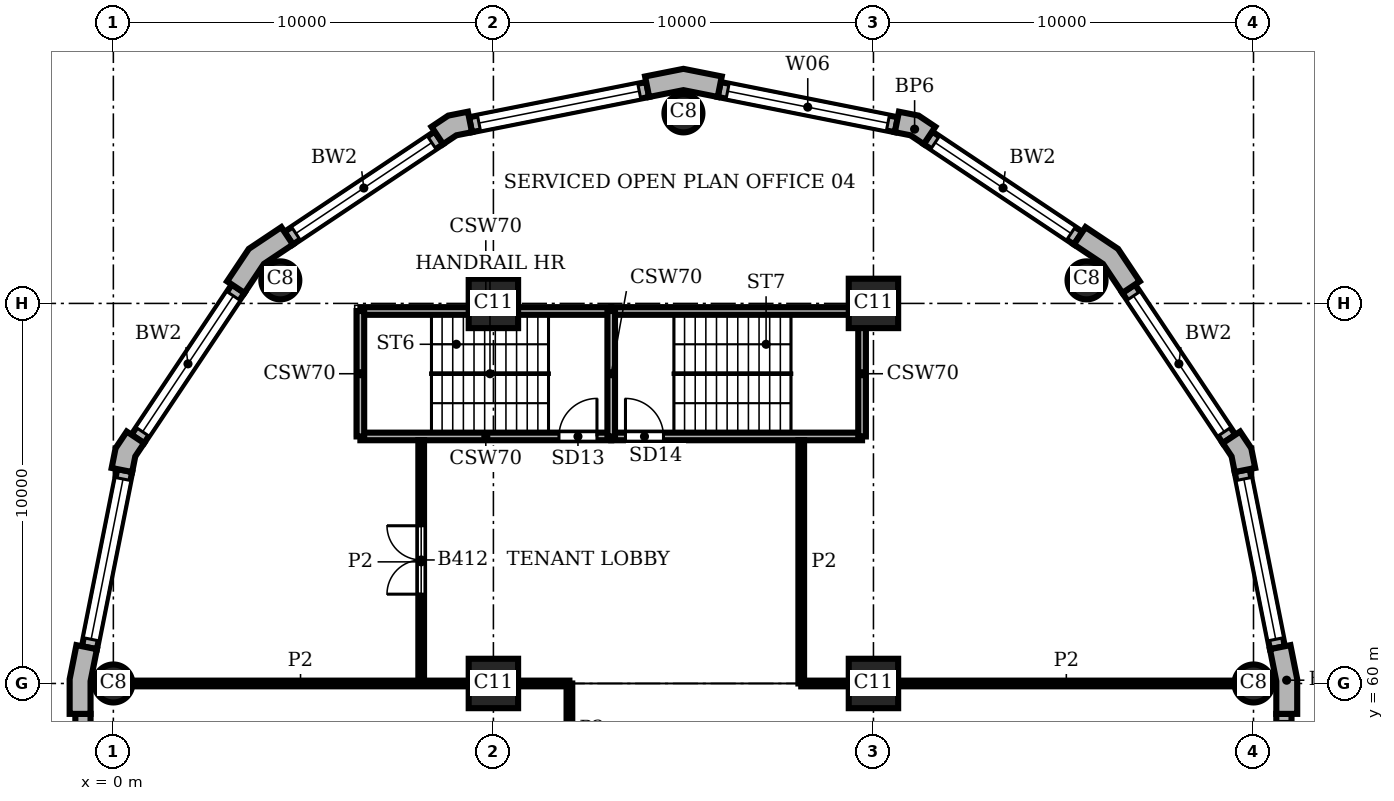
"""IFC4 building model, lengths in metres.
Left out: names, types, materials, properties, quantities, classifications, styles, units other than length and angle.
Written with IfcOpenShell. Run it as: python <this file> out.ifc"""

import sys

from ifc_helpers import new_model, si_unit, direction, frame, frame_2d, origin, origin_2d, place, context, subcontext, project, spatial, polyline, rectangle, circle, outline, extrude, element, fill, save


model = new_model("IFC4")
c1 = context("Model", 3, precision=1e-05, world=origin(), true_north=direction((0.0, 1.0)))
c2 = subcontext(c1, "Body", "Model", "MODEL_VIEW")
j1 = project(units=[si_unit("LENGTHUNIT", "METRE"), si_unit("PLANEANGLEUNIT", "RADIAN")], contexts=[c1])
p1 = place(None, origin())
s1 = spatial("IfcSite", under=j1, at=p1, CompositionType="ELEMENT")
p2 = place(p1, origin())
s2 = spatial("IfcBuilding", under=s1, at=p2, CompositionType="ELEMENT")
p3 = place(p2, frame((0.0, 0.0, 166.8)))
s3 = spatial("IfcBuildingStorey", under=s2, at=p3, CompositionType="ELEMENT", Elevation=166.8)
for number, where, z_axis, x_axis in (
    (1, (30.0, 60.0, 0.0), (0.0, 0.0, 1.0), (1.0, 0.0, 0.0)),
    (2, (25.607, 70.607, 0.0), (0.0, 0.0, 1.0), (1.0, 0.0, 0.0)),
    (3, (15.0, 75.0, 0.0), (0.0, 0.0, 1.0), (1.0, 0.0, 0.0)),
    (4, (4.393, 70.607, 0.0), (0.0, 0.0, 1.0), (1.0, 0.0, 0.0)),
    (5, (0.0, 60.0, 0.0), (0.0, 0.0, 1.0), (1.0, 0.0, 0.0)),
):
    element("IfcColumn", number, at=place(p3, frame(where, z_axis=z_axis, x_axis=x_axis)), inside=s3, PredefinedType="COLUMN", context=c2, shape_type="SweptSolid", body=[
        extrude(circle(Radius=0.5, at=origin_2d()), origin(), (0.0, 0.0, 1.0), 3.9),
    ])
for number, where, z_axis, x_axis in (
    (6, (10.0, 60.0, 0.0), (0.0, 0.0, 1.0), (1.0, 0.0, 0.0)),
    (7, (10.0, 70.0, 0.0), (0.0, 0.0, 1.0), (1.0, 0.0, 0.0)),
    (8, (20.0, 60.0, 0.0), (0.0, 0.0, 1.0), (1.0, 0.0, 0.0)),
    (9, (20.0, 70.0, 0.0), (0.0, 0.0, 1.0), (1.0, 0.0, 0.0)),
):
    element("IfcColumn", number, at=place(p3, frame(where, z_axis=z_axis, x_axis=x_axis)), inside=s3, PredefinedType="COLUMN", context=c2, shape_type="SweptSolid", body=[
        extrude(rectangle(XDim=1.3, YDim=1.3, at=origin_2d()), origin(), (0.0, 0.0, 1.0), 3.9),
    ])
p4 = place(p3, origin())
e10 = element("IfcWall", 10, at=p4, inside=s3, PredefinedType="SOLIDWALL", context=c2, shape_type="SweptSolid", body=[
    extrude(outline(polyline([(31.0, 59.2), (31.15, 59.2), (31.15, 60.113), (30.972, 61.009), (30.825, 60.98), (30.432, 60.902), (30.6, 60.059), (30.6, 59.2), (31.0, 59.2)])), origin(), (0.0, 0.0, 1.0), 3.9),
])
e11 = element("IfcWall", 11, at=p4, inside=s3, PredefinedType="SOLIDWALL", context=c2, shape_type="SweptSolid", body=[
    extrude(outline(polyline([(29.897, 65.641), (30.045, 65.67), (29.941, 66.189), (29.648, 66.629), (29.523, 66.545), (29.19, 66.323), (29.423, 65.974), (29.505, 65.563), (29.897, 65.641)])), origin(), (0.0, 0.0, 1.0), 3.9),
])
e12 = element("IfcWall", 12, at=p4, inside=s3, PredefinedType="SOLIDWALL", context=c2, shape_type="SweptSolid", body=[
    extrude(outline(polyline([(26.883, 70.497), (27.007, 70.58), (26.436, 71.436), (25.58, 72.007), (25.497, 71.883), (25.275, 71.55), (26.039, 71.039), (26.55, 70.275), (26.883, 70.497)])), origin(), (0.0, 0.0, 1.0), 3.9),
])
e13 = element("IfcWall", 13, at=p4, inside=s3, PredefinedType="SOLIDWALL", context=c2, shape_type="SweptSolid", body=[
    extrude(outline(polyline([(21.545, 74.523), (21.629, 74.648), (21.189, 74.941), (20.67, 75.045), (20.641, 74.897), (20.563, 74.505), (20.974, 74.423), (21.323, 74.19), (21.545, 74.523)])), origin(), (0.0, 0.0, 1.0), 3.9),
])
e14 = element("IfcWall", 14, at=p4, inside=s3, PredefinedType="SOLIDWALL", context=c2, shape_type="SweptSolid", body=[
    extrude(outline(polyline([(15.98, 75.825), (16.009, 75.972), (15.0, 76.173), (13.991, 75.972), (14.02, 75.825), (14.098, 75.432), (15.0, 75.612), (15.902, 75.432), (15.98, 75.825)])), origin(), (0.0, 0.0, 1.0), 3.9),
])
e15 = element("IfcWall", 15, at=p4, inside=s3, PredefinedType="SOLIDWALL", context=c2, shape_type="SweptSolid", body=[
    extrude(outline(polyline([(9.359, 74.897), (9.33, 75.045), (8.811, 74.941), (8.371, 74.648), (8.455, 74.523), (8.677, 74.19), (9.026, 74.423), (9.437, 74.505), (9.359, 74.897)])), origin(), (0.0, 0.0, 1.0), 3.9),
])
e16 = element("IfcWall", 16, at=p4, inside=s3, PredefinedType="SOLIDWALL", context=c2, shape_type="SweptSolid", body=[
    extrude(outline(polyline([(4.503, 71.883), (4.42, 72.007), (3.564, 71.436), (2.993, 70.58), (3.117, 70.497), (3.45, 70.275), (3.961, 71.039), (4.725, 71.55), (4.503, 71.883)])), origin(), (0.0, 0.0, 1.0), 3.9),
])
e17 = element("IfcWall", 17, at=p4, inside=s3, PredefinedType="SOLIDWALL", context=c2, shape_type="SweptSolid", body=[
    extrude(outline(polyline([(0.477, 66.545), (0.352, 66.629), (0.059, 66.189), (-0.045, 65.67), (0.103, 65.641), (0.495, 65.563), (0.577, 65.974), (0.81, 66.323), (0.477, 66.545)])), origin(), (0.0, 0.0, 1.0), 3.9),
])
e18 = element("IfcWall", 18, at=p4, inside=s3, PredefinedType="SOLIDWALL", context=c2, shape_type="SweptSolid", body=[
    extrude(outline(polyline([(-0.825, 60.98), (-0.972, 61.009), (-1.15, 60.113), (-1.15, 59.2), (-1.0, 59.2), (-0.6, 59.2), (-0.6, 60.059), (-0.432, 60.902), (-0.825, 60.98)])), origin(), (0.0, 0.0, 1.0), 3.9),
])
p5 = place(p3, frame((30.8, 40.8, 0.0), z_axis=(0.0, 0.0, 1.0), x_axis=(0.0, 1.0, 0.0)))
e19 = element("IfcWall", 19, at=p5, inside=s3, PredefinedType="SOLIDWALL", context=c2, shape_type="SweptSolid", body=[
    extrude(rectangle(XDim=18.4, YDim=0.4, at=frame_2d((9.2, 0.0))), origin(), (0.0, 0.0, 1.0), 3.9),
])
p6 = place(p5, frame((0.2, 0.0, 0.9)))
e20 = element("IfcOpeningElement", 20, at=p6, cuts=e19, PredefinedType="OPENING", context=c2, shape_type="SweptSolid", body=[
    extrude(rectangle(XDim=8.0, YDim=2.35, at=frame_2d((4.0, 1.175))), frame((0.0, 0.21, 0.0), z_axis=(0.0, -1.0, 0.0), x_axis=(1.0, 0.0, 0.0)), (0.0, 0.0, 1.0), 0.42),
])
p7 = place(p5, frame((10.2, 0.0, 0.9)))
e21 = element("IfcOpeningElement", 21, at=p7, cuts=e19, PredefinedType="OPENING", context=c2, shape_type="SweptSolid", body=[
    extrude(rectangle(XDim=8.0, YDim=2.35, at=frame_2d((4.0, 1.175))), frame((0.0, 0.21, 0.0), z_axis=(0.0, -1.0, 0.0), x_axis=(1.0, 0.0, 0.0)), (0.0, 0.0, 1.0), 0.42),
])
p8 = place(p3, frame((30.629, 60.941, 0.0), z_axis=(0.0, 0.0, 1.0), x_axis=(-0.195098533057, 0.98078364709, 0.0)))
e22 = element("IfcWall", 22, at=p8, inside=s3, PredefinedType="SOLIDWALL", context=c2, shape_type="SweptSolid", body=[
    extrude(rectangle(XDim=4.753, YDim=0.4, at=frame_2d((2.376, 0.0))), origin(), (0.0, 0.0, 1.0), 3.9),
])
p9 = place(p8, frame((0.226, 0.0, 0.9)))
e23 = element("IfcOpeningElement", 23, at=p9, cuts=e22, PredefinedType="OPENING", context=c2, shape_type="SweptSolid", body=[
    extrude(rectangle(XDim=4.3, YDim=2.35, at=frame_2d((2.15, 1.175))), frame((0.0, 0.21, 0.0), z_axis=(0.0, -1.0, 0.0), x_axis=(1.0, 0.0, 0.0)), (0.0, 0.0, 1.0), 0.42),
])
p10 = place(p3, frame((29.357, 66.434, 0.0), z_axis=(0.0, 0.0, 1.0), x_axis=(-0.555541552266, 0.831488775454, 0.0)))
e24 = element("IfcWall", 24, at=p10, inside=s3, PredefinedType="SOLIDWALL", context=c2, shape_type="SweptSolid", body=[
    extrude(rectangle(XDim=4.753, YDim=0.4, at=frame_2d((2.376, 0.0))), origin(), (0.0, 0.0, 1.0), 3.9),
])
p11 = place(p10, frame((0.226, 0.0, 0.9)))
e25 = element("IfcOpeningElement", 25, at=p11, cuts=e24, PredefinedType="OPENING", context=c2, shape_type="SweptSolid", body=[
    extrude(rectangle(XDim=4.3, YDim=2.35, at=frame_2d((2.15, 1.175))), frame((0.0, 0.21, 0.0), z_axis=(0.0, -1.0, 0.0), x_axis=(1.0, 0.0, 0.0)), (0.0, 0.0, 1.0), 0.42),
])
p12 = place(p3, frame((25.386, 71.716, 0.0), z_axis=(0.0, 0.0, 1.0), x_axis=(-0.831488775454, 0.555541552266, 0.0)))
e26 = element("IfcWall", 26, at=p12, inside=s3, PredefinedType="SOLIDWALL", context=c2, shape_type="SweptSolid", body=[
    extrude(rectangle(XDim=4.753, YDim=0.4, at=frame_2d((2.376, 0.0))), origin(), (0.0, 0.0, 1.0), 3.9),
])
p13 = place(p12, frame((0.226, 0.0, 0.9)))
e27 = element("IfcOpeningElement", 27, at=p13, cuts=e26, PredefinedType="OPENING", context=c2, shape_type="SweptSolid", body=[
    extrude(rectangle(XDim=4.3, YDim=2.35, at=frame_2d((2.15, 1.175))), frame((0.0, 0.21, 0.0), z_axis=(0.0, -1.0, 0.0), x_axis=(1.0, 0.0, 0.0)), (0.0, 0.0, 1.0), 0.42),
])
p14 = place(p3, frame((20.602, 74.701, 0.0), z_axis=(0.0, 0.0, 1.0), x_axis=(-0.98078364709, 0.195098533057, 0.0)))
e28 = element("IfcWall", 28, at=p14, inside=s3, PredefinedType="SOLIDWALL", context=c2, shape_type="SweptSolid", body=[
    extrude(rectangle(XDim=4.753, YDim=0.4, at=frame_2d((2.376, 0.0))), origin(), (0.0, 0.0, 1.0), 3.9),
])
p15 = place(p14, frame((0.226, 0.0, 0.9)))
e29 = element("IfcOpeningElement", 29, at=p15, cuts=e28, PredefinedType="OPENING", context=c2, shape_type="SweptSolid", body=[
    extrude(rectangle(XDim=4.3, YDim=2.35, at=frame_2d((2.15, 1.175))), frame((0.0, 0.21, 0.0), z_axis=(0.0, -1.0, 0.0), x_axis=(1.0, 0.0, 0.0)), (0.0, 0.0, 1.0), 0.42),
])
p16 = place(p3, frame((14.059, 75.629, 0.0), z_axis=(0.0, 0.0, 1.0), x_axis=(-0.98078364709, -0.195098533057, 0.0)))
e30 = element("IfcWall", 30, at=p16, inside=s3, PredefinedType="SOLIDWALL", context=c2, shape_type="SweptSolid", body=[
    extrude(rectangle(XDim=4.753, YDim=0.4, at=frame_2d((2.376, 0.0))), origin(), (0.0, 0.0, 1.0), 3.9),
])
p17 = place(p16, frame((0.226, 0.0, 0.9)))
e31 = element("IfcOpeningElement", 31, at=p17, cuts=e30, PredefinedType="OPENING", context=c2, shape_type="SweptSolid", body=[
    extrude(rectangle(XDim=4.3, YDim=2.35, at=frame_2d((2.15, 1.175))), frame((0.0, 0.21, 0.0), z_axis=(0.0, -1.0, 0.0), x_axis=(1.0, 0.0, 0.0)), (0.0, 0.0, 1.0), 0.42),
])
p18 = place(p3, frame((8.566, 74.357, 0.0), z_axis=(0.0, 0.0, 1.0), x_axis=(-0.831488775454, -0.555541552266, 0.0)))
e32 = element("IfcWall", 32, at=p18, inside=s3, PredefinedType="SOLIDWALL", context=c2, shape_type="SweptSolid", body=[
    extrude(rectangle(XDim=4.753, YDim=0.4, at=frame_2d((2.376, 0.0))), origin(), (0.0, 0.0, 1.0), 3.9),
])
p19 = place(p18, frame((0.226, 0.0, 0.9)))
e33 = element("IfcOpeningElement", 33, at=p19, cuts=e32, PredefinedType="OPENING", context=c2, shape_type="SweptSolid", body=[
    extrude(rectangle(XDim=4.3, YDim=2.35, at=frame_2d((2.15, 1.175))), frame((0.0, 0.21, 0.0), z_axis=(0.0, -1.0, 0.0), x_axis=(1.0, 0.0, 0.0)), (0.0, 0.0, 1.0), 0.42),
])
p20 = place(p3, frame((3.284, 70.386, 0.0), z_axis=(0.0, 0.0, 1.0), x_axis=(-0.555541552266, -0.831488775454, 0.0)))
e34 = element("IfcWall", 34, at=p20, inside=s3, PredefinedType="SOLIDWALL", context=c2, shape_type="SweptSolid", body=[
    extrude(rectangle(XDim=4.753, YDim=0.4, at=frame_2d((2.376, 0.0))), origin(), (0.0, 0.0, 1.0), 3.9),
])
p21 = place(p20, frame((0.226, 0.0, 0.9)))
e35 = element("IfcOpeningElement", 35, at=p21, cuts=e34, PredefinedType="OPENING", context=c2, shape_type="SweptSolid", body=[
    extrude(rectangle(XDim=4.3, YDim=2.35, at=frame_2d((2.15, 1.175))), frame((0.0, 0.21, 0.0), z_axis=(0.0, -1.0, 0.0), x_axis=(1.0, 0.0, 0.0)), (0.0, 0.0, 1.0), 0.42),
])
p22 = place(p3, frame((0.299, 65.602, 0.0), z_axis=(0.0, 0.0, 1.0), x_axis=(-0.195098533057, -0.98078364709, 0.0)))
e36 = element("IfcWall", 36, at=p22, inside=s3, PredefinedType="SOLIDWALL", context=c2, shape_type="SweptSolid", body=[
    extrude(rectangle(XDim=4.753, YDim=0.4, at=frame_2d((2.376, 0.0))), origin(), (0.0, 0.0, 1.0), 3.9),
])
p23 = place(p22, frame((0.226, 0.0, 0.9)))
e37 = element("IfcOpeningElement", 37, at=p23, cuts=e36, PredefinedType="OPENING", context=c2, shape_type="SweptSolid", body=[
    extrude(rectangle(XDim=4.3, YDim=2.35, at=frame_2d((2.15, 1.175))), frame((0.0, 0.21, 0.0), z_axis=(0.0, -1.0, 0.0), x_axis=(1.0, 0.0, 0.0)), (0.0, 0.0, 1.0), 0.42),
])
p24 = place(p3, frame((-0.8, 59.2, 0.0), z_axis=(0.0, 0.0, 1.0), x_axis=(0.0, -1.0, 0.0)))
e38 = element("IfcWall", 38, at=p24, inside=s3, PredefinedType="SOLIDWALL", context=c2, shape_type="SweptSolid", body=[
    extrude(rectangle(XDim=18.4, YDim=0.4, at=frame_2d((9.2, 0.0))), origin(), (0.0, 0.0, 1.0), 3.9),
])
p25 = place(p24, frame((3.75, 0.0, 0.9)))
e39 = element("IfcOpeningElement", 39, at=p25, cuts=e38, PredefinedType="OPENING", context=c2, shape_type="SweptSolid", body=[
    extrude(rectangle(XDim=0.9, YDim=2.35, at=frame_2d((0.45, 1.175))), frame((0.0, 0.21, 0.0), z_axis=(0.0, -1.0, 0.0), x_axis=(1.0, 0.0, 0.0)), (0.0, 0.0, 1.0), 0.42),
])
p26 = place(p24, frame((13.75, 0.0, 0.9)))
e40 = element("IfcOpeningElement", 40, at=p26, cuts=e38, PredefinedType="OPENING", context=c2, shape_type="SweptSolid", body=[
    extrude(rectangle(XDim=0.9, YDim=2.35, at=frame_2d((0.45, 1.175))), frame((0.0, 0.21, 0.0), z_axis=(0.0, -1.0, 0.0), x_axis=(1.0, 0.0, 0.0)), (0.0, 0.0, 1.0), 0.42),
])
p27 = place(p3, frame((6.5, 66.5, 0.0), z_axis=(0.0, 0.0, 1.0), x_axis=(1.0, 0.0, 0.0)))
e41 = element("IfcWall", 41, at=p27, inside=s3, PredefinedType="SHEAR", context=c2, shape_type="SweptSolid", body=[
    extrude(rectangle(XDim=6.6, YDim=0.2, at=frame_2d((3.3, 0.0))), origin(), (0.0, 0.0, 1.0), 3.58),
])
p28 = place(p27, frame((5.225, 0.0, 0.0)))
e42 = element("IfcOpeningElement", 42, at=p28, cuts=e41, PredefinedType="OPENING", context=c2, shape_type="SweptSolid", body=[
    extrude(rectangle(XDim=1.0, YDim=2.1, at=frame_2d((0.5, 1.05))), frame((0.0, 0.11, 0.0), z_axis=(0.0, -1.0, 0.0), x_axis=(1.0, 0.0, 0.0)), (0.0, 0.0, 1.0), 0.22),
])
p29 = place(p3, frame((13.1, 66.5, 0.0), z_axis=(0.0, 0.0, 1.0), x_axis=(1.0, 0.0, 0.0)))
e43 = element("IfcWall", 43, at=p29, inside=s3, PredefinedType="SHEAR", context=c2, shape_type="SweptSolid", body=[
    extrude(rectangle(XDim=6.6, YDim=0.2, at=frame_2d((3.3, 0.0))), origin(), (0.0, 0.0, 1.0), 3.58),
])
p30 = place(p29, frame((0.375, 0.0, 0.0)))
e44 = element("IfcOpeningElement", 44, at=p30, cuts=e43, PredefinedType="OPENING", context=c2, shape_type="SweptSolid", body=[
    extrude(rectangle(XDim=1.0, YDim=2.1, at=frame_2d((0.5, 1.05))), frame((0.0, 0.11, 0.0), z_axis=(0.0, -1.0, 0.0), x_axis=(1.0, 0.0, 0.0)), (0.0, 0.0, 1.0), 0.22),
])
p31 = place(p3, frame((6.5, 69.8, 0.0), z_axis=(0.0, 0.0, 1.0), x_axis=(1.0, 0.0, 0.0)))
e45 = element("IfcWall", 45, at=p31, inside=s3, PredefinedType="SHEAR", context=c2, shape_type="SweptSolid", body=[
    extrude(rectangle(XDim=6.6, YDim=0.2, at=frame_2d((3.3, 0.0))), origin(), (0.0, 0.0, 1.0), 3.58),
])
p32 = place(p3, frame((13.1, 69.8, 0.0), z_axis=(0.0, 0.0, 1.0), x_axis=(1.0, 0.0, 0.0)))
e46 = element("IfcWall", 46, at=p32, inside=s3, PredefinedType="SHEAR", context=c2, shape_type="SweptSolid", body=[
    extrude(rectangle(XDim=6.6, YDim=0.2, at=frame_2d((3.3, 0.0))), origin(), (0.0, 0.0, 1.0), 3.58),
])
for number, where, z_axis, x_axis in (
    (47, (6.5, 66.5, 0.0), (0.0, 0.0, 1.0), (0.0, 1.0, 0.0)),
    (48, (13.1, 66.5, 0.0), (0.0, 0.0, 1.0), (0.0, 1.0, 0.0)),
    (49, (19.7, 66.5, 0.0), (0.0, 0.0, 1.0), (0.0, 1.0, 0.0)),
):
    element("IfcWall", number, at=place(p3, frame(where, z_axis=z_axis, x_axis=x_axis)), inside=s3, PredefinedType="SHEAR", context=c2, shape_type="SweptSolid", body=[
        extrude(rectangle(XDim=3.3, YDim=0.2, at=frame_2d((1.65, 0.0))), origin(), (0.0, 0.0, 1.0), 3.58),
    ])
p33 = place(p3, frame((8.1, 60.0, 0.0), z_axis=(0.0, 0.0, 1.0), x_axis=(0.0, 1.0, 0.0)))
e50 = element("IfcWall", 50, at=p33, inside=s3, PredefinedType="PARTITIONING", context=c2, shape_type="SweptSolid", body=[
    extrude(rectangle(XDim=6.4, YDim=0.15, at=frame_2d((3.2, 0.0))), origin(), (0.0, 0.0, 1.0), 3.58),
])
p34 = place(p33, frame((2.35, 0.0, 0.0)))
e51 = element("IfcOpeningElement", 51, at=p34, cuts=e50, PredefinedType="OPENING", context=c2, shape_type="SweptSolid", body=[
    extrude(rectangle(XDim=1.8, YDim=2.1, at=frame_2d((0.9, 1.05))), frame((0.0, 0.085, 0.0), z_axis=(0.0, -1.0, 0.0), x_axis=(1.0, 0.0, 0.0)), (0.0, 0.0, 1.0), 0.17),
])
p35 = place(p3, frame((12.0, 57.6, 0.0), z_axis=(0.0, 0.0, 1.0), x_axis=(0.0, 1.0, 0.0)))
e52 = element("IfcWall", 52, at=p35, inside=s3, PredefinedType="PARTITIONING", context=c2, shape_type="SweptSolid", body=[
    extrude(rectangle(XDim=2.4, YDim=0.15, at=frame_2d((1.2, 0.0))), origin(), (0.0, 0.0, 1.0), 3.58),
])
p36 = place(p3, frame((18.1, 60.0, 0.0), z_axis=(0.0, 0.0, 1.0), x_axis=(0.0, 1.0, 0.0)))
e53 = element("IfcWall", 53, at=p36, inside=s3, PredefinedType="PARTITIONING", context=c2, shape_type="SweptSolid", body=[
    extrude(rectangle(XDim=6.4, YDim=0.15, at=frame_2d((3.2, 0.0))), origin(), (0.0, 0.0, 1.0), 3.58),
])
p37 = place(p3, frame((0.5, 60.0, 0.0), z_axis=(0.0, 0.0, 1.0), x_axis=(1.0, 0.0, 0.0)))
e54 = element("IfcWall", 54, at=p37, inside=s3, PredefinedType="PARTITIONING", context=c2, shape_type="SweptSolid", body=[
    extrude(rectangle(XDim=8.85, YDim=0.15, at=frame_2d((4.425, 0.0))), origin(), (0.0, 0.0, 1.0), 3.58),
])
p38 = place(p3, frame((10.65, 60.0, 0.0), z_axis=(0.0, 0.0, 1.0), x_axis=(1.0, 0.0, 0.0)))
e55 = element("IfcWall", 55, at=p38, inside=s3, PredefinedType="PARTITIONING", context=c2, shape_type="SweptSolid", body=[
    extrude(rectangle(XDim=1.35, YDim=0.15, at=frame_2d((0.675, 0.0))), origin(), (0.0, 0.0, 1.0), 3.58),
])
p39 = place(p3, frame((18.1, 60.0, 0.0), z_axis=(0.0, 0.0, 1.0), x_axis=(1.0, 0.0, 0.0)))
e56 = element("IfcWall", 56, at=p39, inside=s3, PredefinedType="PARTITIONING", context=c2, shape_type="SweptSolid", body=[
    extrude(rectangle(XDim=1.25, YDim=0.15, at=frame_2d((0.625, 0.0))), origin(), (0.0, 0.0, 1.0), 3.58),
])
p40 = place(p3, frame((20.65, 60.0, 0.0), z_axis=(0.0, 0.0, 1.0), x_axis=(1.0, 0.0, 0.0)))
e57 = element("IfcWall", 57, at=p40, inside=s3, PredefinedType="PARTITIONING", context=c2, shape_type="SweptSolid", body=[
    extrude(rectangle(XDim=8.85, YDim=0.15, at=frame_2d((4.425, 0.0))), origin(), (0.0, 0.0, 1.0), 3.58),
])
p41 = place(p9, origin())
e58 = element("IfcWindow", 58, at=p41, inside=s3, PartitioningType="SINGLE_PANEL", PredefinedType="WINDOW", context=c2, shape_type="SweptSolid", body=[
    extrude(rectangle(XDim=4.3, YDim=2.35, at=frame_2d((2.15, 1.175))), frame((0.0, 0.16, 0.0), z_axis=(0.0, -1.0, 0.0), x_axis=(1.0, 0.0, 0.0)), (0.0, 0.0, 1.0), 0.06),
])
fill(e23, e58)
p42 = place(p11, origin())
e59 = element("IfcWindow", 59, at=p42, inside=s3, PartitioningType="SINGLE_PANEL", PredefinedType="WINDOW", context=c2, shape_type="SweptSolid", body=[
    extrude(rectangle(XDim=4.3, YDim=2.35, at=frame_2d((2.15, 1.175))), frame((0.0, 0.16, 0.0), z_axis=(0.0, -1.0, 0.0), x_axis=(1.0, 0.0, 0.0)), (0.0, 0.0, 1.0), 0.06),
])
fill(e25, e59)
p43 = place(p13, origin())
e60 = element("IfcWindow", 60, at=p43, inside=s3, PartitioningType="SINGLE_PANEL", PredefinedType="WINDOW", context=c2, shape_type="SweptSolid", body=[
    extrude(rectangle(XDim=4.3, YDim=2.35, at=frame_2d((2.15, 1.175))), frame((0.0, 0.16, 0.0), z_axis=(0.0, -1.0, 0.0), x_axis=(1.0, 0.0, 0.0)), (0.0, 0.0, 1.0), 0.06),
])
fill(e27, e60)
p44 = place(p15, origin())
e61 = element("IfcWindow", 61, at=p44, inside=s3, PartitioningType="SINGLE_PANEL", PredefinedType="WINDOW", context=c2, shape_type="SweptSolid", body=[
    extrude(rectangle(XDim=4.3, YDim=2.35, at=frame_2d((2.15, 1.175))), frame((0.0, 0.16, 0.0), z_axis=(0.0, -1.0, 0.0), x_axis=(1.0, 0.0, 0.0)), (0.0, 0.0, 1.0), 0.06),
])
fill(e29, e61)
p45 = place(p17, origin())
e62 = element("IfcWindow", 62, at=p45, inside=s3, PartitioningType="SINGLE_PANEL", PredefinedType="WINDOW", context=c2, shape_type="SweptSolid", body=[
    extrude(rectangle(XDim=4.3, YDim=2.35, at=frame_2d((2.15, 1.175))), frame((0.0, 0.16, 0.0), z_axis=(0.0, -1.0, 0.0), x_axis=(1.0, 0.0, 0.0)), (0.0, 0.0, 1.0), 0.06),
])
fill(e31, e62)
p46 = place(p19, origin())
e63 = element("IfcWindow", 63, at=p46, inside=s3, PartitioningType="SINGLE_PANEL", PredefinedType="WINDOW", context=c2, shape_type="SweptSolid", body=[
    extrude(rectangle(XDim=4.3, YDim=2.35, at=frame_2d((2.15, 1.175))), frame((0.0, 0.16, 0.0), z_axis=(0.0, -1.0, 0.0), x_axis=(1.0, 0.0, 0.0)), (0.0, 0.0, 1.0), 0.06),
])
fill(e33, e63)
p47 = place(p21, origin())
e64 = element("IfcWindow", 64, at=p47, inside=s3, PartitioningType="SINGLE_PANEL", PredefinedType="WINDOW", context=c2, shape_type="SweptSolid", body=[
    extrude(rectangle(XDim=4.3, YDim=2.35, at=frame_2d((2.15, 1.175))), frame((0.0, 0.16, 0.0), z_axis=(0.0, -1.0, 0.0), x_axis=(1.0, 0.0, 0.0)), (0.0, 0.0, 1.0), 0.06),
])
fill(e35, e64)
p48 = place(p23, origin())
e65 = element("IfcWindow", 65, at=p48, inside=s3, PartitioningType="SINGLE_PANEL", PredefinedType="WINDOW", context=c2, shape_type="SweptSolid", body=[
    extrude(rectangle(XDim=4.3, YDim=2.35, at=frame_2d((2.15, 1.175))), frame((0.0, 0.16, 0.0), z_axis=(0.0, -1.0, 0.0), x_axis=(1.0, 0.0, 0.0)), (0.0, 0.0, 1.0), 0.06),
])
fill(e37, e65)
p49 = place(p28, origin())
e66 = element("IfcDoor", 66, at=p49, inside=s3, OperationType="SINGLE_SWING_RIGHT", PredefinedType="DOOR", context=c2, shape_type="SweptSolid", body=[
    extrude(rectangle(XDim=1.0, YDim=2.1, at=frame_2d((0.5, 1.05))), frame((0.0, 0.025, 0.0), z_axis=(0.0, -1.0, 0.0), x_axis=(1.0, 0.0, 0.0)), (0.0, 0.0, 1.0), 0.05),
])
fill(e42, e66)
p50 = place(p30, origin())
e67 = element("IfcDoor", 67, at=p50, inside=s3, OperationType="SINGLE_SWING_LEFT", PredefinedType="DOOR", context=c2, shape_type="SweptSolid", body=[
    extrude(rectangle(XDim=1.0, YDim=2.1, at=frame_2d((0.5, 1.05))), frame((0.0, 0.025, 0.0), z_axis=(0.0, -1.0, 0.0), x_axis=(1.0, 0.0, 0.0)), (0.0, 0.0, 1.0), 0.05),
])
fill(e44, e67)
p51 = place(p34, origin())
e68 = element("IfcDoor", 68, at=p51, inside=s3, OperationType="DOUBLE_DOOR_SINGLE_SWING", PredefinedType="DOOR", context=c2, shape_type="SweptSolid", body=[
    extrude(rectangle(XDim=1.8, YDim=2.1, at=frame_2d((0.9, 1.05))), frame((0.0, 0.025, 0.0), z_axis=(0.0, -1.0, 0.0), x_axis=(1.0, 0.0, 0.0)), (0.0, 0.0, 1.0), 0.05),
])
fill(e51, e68)
save(model, sys.argv[1])
